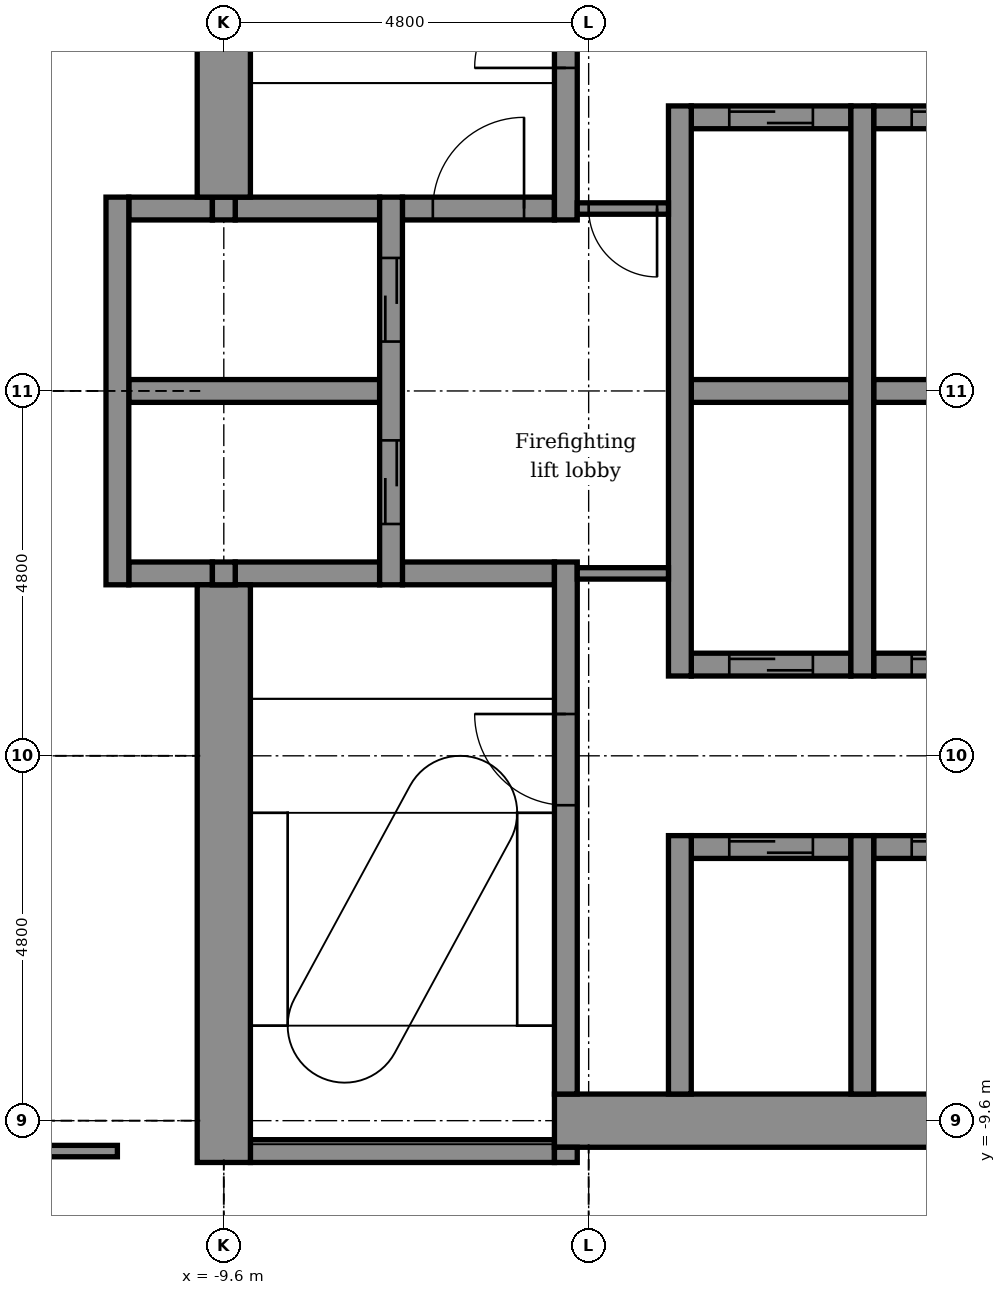
"""IFC4 building model, lengths in metres.
Left out: names, types, materials, properties, quantities, classifications, styles, units other than length and angle.
Written with IfcOpenShell. Run it as: python <this file> out.ifc"""

import sys

from ifc_helpers import new_model, si_unit, direction, frame, frame_2d, origin, place, context, subcontext, project, spatial, rectangle, extrude, element, fill, save


model = new_model("IFC4")
c1 = context("Model", 3, precision=1e-05, world=origin(), true_north=direction((0.0, 1.0)))
c2 = subcontext(c1, "Body", "Model", "MODEL_VIEW")
j1 = project(units=[si_unit("LENGTHUNIT", "METRE"), si_unit("PLANEANGLEUNIT", "RADIAN")], contexts=[c1])
p1 = place(None, origin())
s1 = spatial("IfcSite", under=j1, at=p1, CompositionType="ELEMENT")
p2 = place(p1, origin())
s2 = spatial("IfcBuilding", under=s1, at=p2, CompositionType="ELEMENT")
p3 = place(p2, frame((0.0, 0.0, 154.4)))
s3 = spatial("IfcBuildingStorey", under=s2, at=p3, CompositionType="ELEMENT", Elevation=154.4)
p4 = place(p3, frame((-9.25, -10.0, -0.15), z_axis=(0.0, 0.0, 1.0), x_axis=(1.0, 0.0, 0.0)))
e1 = element("IfcWall", 1, at=p4, inside=s3, PredefinedType="STANDARD", context=c2, shape_type="SweptSolid", body=[
    extrude(rectangle(XDim=4.0, YDim=0.3, at=frame_2d((2.0, 0.0))), origin(), (0.0, 0.0, 1.0), 3.9),
])
p5 = place(p3, frame((-5.25, -9.6, -0.15), z_axis=(0.0, 0.0, 1.0), x_axis=(1.0, 0.0, 0.0)))
e2 = element("IfcWall", 2, at=p5, inside=s3, PredefinedType="SHEAR", context=c2, shape_type="SweptSolid", body=[
    extrude(rectangle(XDim=10.2, YDim=0.7, at=frame_2d((5.1, 0.0))), origin(), (0.0, 0.0, 1.0), 3.9),
])
p6 = place(p5, frame((9.0, 0.0, 0.15)))
e3 = element("IfcOpeningElement", 3, at=p6, cuts=e2, PredefinedType="OPENING", context=c2, shape_type="SweptSolid", body=[
    extrude(rectangle(XDim=0.9, YDim=2.1, at=frame_2d((0.45, 1.05))), frame((0.0, 0.36, 0.0), z_axis=(0.0, -1.0, 0.0), x_axis=(1.0, 0.0, 0.0)), (0.0, 0.0, 1.0), 0.72),
])
p7 = place(p3, frame((-3.45, -6.0, -0.15), z_axis=(0.0, 0.0, 1.0), x_axis=(1.0, 0.0, 0.0)))
e4 = element("IfcWall", 4, at=p7, inside=s3, PredefinedType="STANDARD", context=c2, shape_type="SweptSolid", body=[
    extrude(rectangle(XDim=2.1, YDim=0.3, at=frame_2d((1.05, 0.0))), origin(), (0.0, 0.0, 1.0), 3.9),
])
p8 = place(p7, frame((0.5, 0.0, 0.15)))
e5 = element("IfcOpeningElement", 5, at=p8, cuts=e4, PredefinedType="OPENING", context=c2, shape_type="SweptSolid", body=[
    extrude(rectangle(XDim=1.1, YDim=2.1, at=frame_2d((0.55, 1.05))), frame((0.0, 0.16, 0.0), z_axis=(0.0, -1.0, 0.0), x_axis=(1.0, 0.0, 0.0)), (0.0, 0.0, 1.0), 0.32),
])
p9 = place(p3, frame((-1.05, -6.0, -0.15), z_axis=(0.0, 0.0, 1.0), x_axis=(1.0, 0.0, 0.0)))
e6 = element("IfcWall", 6, at=p9, inside=s3, PredefinedType="STANDARD", context=c2, shape_type="SweptSolid", body=[
    extrude(rectangle(XDim=2.1, YDim=0.3, at=frame_2d((1.05, 0.0))), origin(), (0.0, 0.0, 1.0), 3.9),
])
p10 = place(p9, frame((0.5, 0.0, 0.15)))
e7 = element("IfcOpeningElement", 7, at=p10, cuts=e6, PredefinedType="OPENING", context=c2, shape_type="SweptSolid", body=[
    extrude(rectangle(XDim=1.1, YDim=2.1, at=frame_2d((0.55, 1.05))), frame((0.0, 0.16, 0.0), z_axis=(0.0, -1.0, 0.0), x_axis=(1.0, 0.0, 0.0)), (0.0, 0.0, 1.0), 0.32),
])
p11 = place(p3, frame((-3.45, -3.6, -0.15), z_axis=(0.0, 0.0, 1.0), x_axis=(1.0, 0.0, 0.0)))
e8 = element("IfcWall", 8, at=p11, inside=s3, PredefinedType="STANDARD", context=c2, shape_type="SweptSolid", body=[
    extrude(rectangle(XDim=2.1, YDim=0.3, at=frame_2d((1.05, 0.0))), origin(), (0.0, 0.0, 1.0), 3.9),
])
p12 = place(p11, frame((0.5, 0.0, 0.15)))
e9 = element("IfcOpeningElement", 9, at=p12, cuts=e8, PredefinedType="OPENING", context=c2, shape_type="SweptSolid", body=[
    extrude(rectangle(XDim=1.1, YDim=2.1, at=frame_2d((0.55, 1.05))), frame((0.0, 0.16, 0.0), z_axis=(0.0, -1.0, 0.0), x_axis=(1.0, 0.0, 0.0)), (0.0, 0.0, 1.0), 0.32),
])
p13 = place(p3, frame((-1.05, -3.6, -0.15), z_axis=(0.0, 0.0, 1.0), x_axis=(1.0, 0.0, 0.0)))
e10 = element("IfcWall", 10, at=p13, inside=s3, PredefinedType="STANDARD", context=c2, shape_type="SweptSolid", body=[
    extrude(rectangle(XDim=2.1, YDim=0.3, at=frame_2d((1.05, 0.0))), origin(), (0.0, 0.0, 1.0), 3.9),
])
p14 = place(p13, frame((0.5, 0.0, 0.15)))
e11 = element("IfcOpeningElement", 11, at=p14, cuts=e10, PredefinedType="OPENING", context=c2, shape_type="SweptSolid", body=[
    extrude(rectangle(XDim=1.1, YDim=2.1, at=frame_2d((0.55, 1.05))), frame((0.0, 0.16, 0.0), z_axis=(0.0, -1.0, 0.0), x_axis=(1.0, 0.0, 0.0)), (0.0, 0.0, 1.0), 0.32),
])
p15 = place(p3, frame((-10.85, -2.4, -0.15), z_axis=(0.0, 0.0, 1.0), x_axis=(1.0, 0.0, 0.0)))
e12 = element("IfcWall", 12, at=p15, inside=s3, PredefinedType="STANDARD", context=c2, shape_type="SweptSolid", body=[
    extrude(rectangle(XDim=1.1, YDim=0.3, at=frame_2d((0.55, 0.0))), origin(), (0.0, 0.0, 1.0), 3.9),
])
p16 = place(p3, frame((-9.45, -2.4, -0.15), z_axis=(0.0, 0.0, 1.0), x_axis=(1.0, 0.0, 0.0)))
e13 = element("IfcWall", 13, at=p16, inside=s3, PredefinedType="STANDARD", context=c2, shape_type="SweptSolid", body=[
    extrude(rectangle(XDim=1.9, YDim=0.3, at=frame_2d((0.95, 0.0))), origin(), (0.0, 0.0, 1.0), 3.9),
])
p17 = place(p3, frame((-7.25, -2.4, -0.15), z_axis=(0.0, 0.0, 1.0), x_axis=(1.0, 0.0, 0.0)))
e14 = element("IfcWall", 14, at=p17, inside=s3, PredefinedType="STANDARD", context=c2, shape_type="SweptSolid", body=[
    extrude(rectangle(XDim=2.0, YDim=0.3, at=frame_2d((1.0, 0.0))), origin(), (0.0, 0.0, 1.0), 3.9),
])
p18 = place(p3, frame((-10.85, 0.0, -0.15), z_axis=(0.0, 0.0, 1.0), x_axis=(1.0, 0.0, 0.0)))
e15 = element("IfcWall", 15, at=p18, inside=s3, PredefinedType="STANDARD", context=c2, shape_type="SweptSolid", body=[
    extrude(rectangle(XDim=3.3, YDim=0.3, at=frame_2d((1.65, 0.0))), origin(), (0.0, 0.0, 1.0), 3.9),
])
p19 = place(p3, frame((-3.45, 0.0, -0.15), z_axis=(0.0, 0.0, 1.0), x_axis=(1.0, 0.0, 0.0)))
e16 = element("IfcWall", 16, at=p19, inside=s3, PredefinedType="STANDARD", context=c2, shape_type="SweptSolid", body=[
    extrude(rectangle(XDim=2.1, YDim=0.3, at=frame_2d((1.05, 0.0))), origin(), (0.0, 0.0, 1.0), 3.9),
])
p20 = place(p3, frame((-1.05, 0.0, -0.15), z_axis=(0.0, 0.0, 1.0), x_axis=(1.0, 0.0, 0.0)))
e17 = element("IfcWall", 17, at=p20, inside=s3, PredefinedType="STANDARD", context=c2, shape_type="SweptSolid", body=[
    extrude(rectangle(XDim=2.1, YDim=0.3, at=frame_2d((1.05, 0.0))), origin(), (0.0, 0.0, 1.0), 3.9),
])
p21 = place(p3, frame((-10.85, 2.4, -0.15), z_axis=(0.0, 0.0, 1.0), x_axis=(1.0, 0.0, 0.0)))
e18 = element("IfcWall", 18, at=p21, inside=s3, PredefinedType="STANDARD", context=c2, shape_type="SweptSolid", body=[
    extrude(rectangle(XDim=1.1, YDim=0.3, at=frame_2d((0.55, 0.0))), origin(), (0.0, 0.0, 1.0), 3.9),
])
p22 = place(p3, frame((-9.45, 2.4, -0.15), z_axis=(0.0, 0.0, 1.0), x_axis=(1.0, 0.0, 0.0)))
e19 = element("IfcWall", 19, at=p22, inside=s3, PredefinedType="STANDARD", context=c2, shape_type="SweptSolid", body=[
    extrude(rectangle(XDim=1.9, YDim=0.3, at=frame_2d((0.95, 0.0))), origin(), (0.0, 0.0, 1.0), 3.9),
])
p23 = place(p3, frame((-7.25, 2.4, -0.15), z_axis=(0.0, 0.0, 1.0), x_axis=(1.0, 0.0, 0.0)))
e20 = element("IfcWall", 20, at=p23, inside=s3, PredefinedType="STANDARD", context=c2, shape_type="SweptSolid", body=[
    extrude(rectangle(XDim=2.0, YDim=0.3, at=frame_2d((1.0, 0.0))), origin(), (0.0, 0.0, 1.0), 3.9),
])
p24 = place(p23, frame((0.4, 0.0, 0.15)))
e21 = element("IfcOpeningElement", 21, at=p24, cuts=e20, PredefinedType="OPENING", context=c2, shape_type="SweptSolid", body=[
    extrude(rectangle(XDim=1.2, YDim=2.1, at=frame_2d((0.6, 1.05))), frame((0.0, 0.16, 0.0), z_axis=(0.0, -1.0, 0.0), x_axis=(1.0, 0.0, 0.0)), (0.0, 0.0, 1.0), 0.32),
])
p25 = place(p3, frame((-3.45, 3.6, -0.15), z_axis=(0.0, 0.0, 1.0), x_axis=(1.0, 0.0, 0.0)))
e22 = element("IfcWall", 22, at=p25, inside=s3, PredefinedType="STANDARD", context=c2, shape_type="SweptSolid", body=[
    extrude(rectangle(XDim=2.1, YDim=0.3, at=frame_2d((1.05, 0.0))), origin(), (0.0, 0.0, 1.0), 3.9),
])
p26 = place(p25, frame((0.5, 0.0, 0.15)))
e23 = element("IfcOpeningElement", 23, at=p26, cuts=e22, PredefinedType="OPENING", context=c2, shape_type="SweptSolid", body=[
    extrude(rectangle(XDim=1.1, YDim=2.1, at=frame_2d((0.55, 1.05))), frame((0.0, 0.16, 0.0), z_axis=(0.0, -1.0, 0.0), x_axis=(1.0, 0.0, 0.0)), (0.0, 0.0, 1.0), 0.32),
])
p27 = place(p3, frame((-1.05, 3.6, -0.15), z_axis=(0.0, 0.0, 1.0), x_axis=(1.0, 0.0, 0.0)))
e24 = element("IfcWall", 24, at=p27, inside=s3, PredefinedType="STANDARD", context=c2, shape_type="SweptSolid", body=[
    extrude(rectangle(XDim=2.1, YDim=0.3, at=frame_2d((1.05, 0.0))), origin(), (0.0, 0.0, 1.0), 3.9),
])
p28 = place(p27, frame((0.5, 0.0, 0.15)))
e25 = element("IfcOpeningElement", 25, at=p28, cuts=e24, PredefinedType="OPENING", context=c2, shape_type="SweptSolid", body=[
    extrude(rectangle(XDim=1.1, YDim=2.1, at=frame_2d((0.55, 1.05))), frame((0.0, 0.16, 0.0), z_axis=(0.0, -1.0, 0.0), x_axis=(1.0, 0.0, 0.0)), (0.0, 0.0, 1.0), 0.32),
])
p29 = place(p3, frame((-11.0, -2.55, -0.15), z_axis=(0.0, 0.0, 1.0), x_axis=(0.0, 1.0, 0.0)))
e26 = element("IfcWall", 26, at=p29, inside=s3, PredefinedType="STANDARD", context=c2, shape_type="SweptSolid", body=[
    extrude(rectangle(XDim=5.1, YDim=0.3, at=frame_2d((2.55, 0.0))), origin(), (0.0, 0.0, 1.0), 3.9),
])
p30 = place(p3, frame((-9.6, -10.15, -0.15), z_axis=(0.0, 0.0, 1.0), x_axis=(0.0, 1.0, 0.0)))
e27 = element("IfcWall", 27, at=p30, inside=s3, PredefinedType="SHEAR", context=c2, shape_type="SweptSolid", body=[
    extrude(rectangle(XDim=7.6, YDim=0.7, at=frame_2d((3.8, 0.0))), origin(), (0.0, 0.0, 1.0), 3.9),
])
for number, where, z_axis, x_axis in (
    (28, (-9.6, -2.55, -0.15), (0.0, 0.0, 1.0), (0.0, 1.0, 0.0)),
    (29, (-9.6, 2.25, -0.15), (0.0, 0.0, 1.0), (0.0, 1.0, 0.0)),
):
    element("IfcWall", number, at=place(p3, frame(where, z_axis=z_axis, x_axis=x_axis)), inside=s3, PredefinedType="STANDARD", context=c2, shape_type="SweptSolid", body=[
        extrude(rectangle(XDim=0.3, YDim=0.3, at=frame_2d((0.15, 0.0))), origin(), (0.0, 0.0, 1.0), 3.9),
    ])
p31 = place(p3, frame((-9.6, 2.55, -0.15), z_axis=(0.0, 0.0, 1.0), x_axis=(0.0, 1.0, 0.0)))
e30 = element("IfcWall", 30, at=p31, inside=s3, PredefinedType="SHEAR", context=c2, shape_type="SweptSolid", body=[
    extrude(rectangle(XDim=7.6, YDim=0.7, at=frame_2d((3.8, 0.0))), origin(), (0.0, 0.0, 1.0), 3.9),
])
p32 = place(p3, frame((-7.4, -2.55, -0.15), z_axis=(0.0, 0.0, 1.0), x_axis=(0.0, 1.0, 0.0)))
e31 = element("IfcWall", 31, at=p32, inside=s3, PredefinedType="STANDARD", context=c2, shape_type="SweptSolid", body=[
    extrude(rectangle(XDim=5.1, YDim=0.3, at=frame_2d((2.55, 0.0))), origin(), (0.0, 0.0, 1.0), 3.9),
])
p33 = place(p32, frame((0.8, 0.0, 0.15)))
e32 = element("IfcOpeningElement", 32, at=p33, cuts=e31, PredefinedType="OPENING", context=c2, shape_type="SweptSolid", body=[
    extrude(rectangle(XDim=1.1, YDim=2.1, at=frame_2d((0.55, 1.05))), frame((0.0, 0.16, 0.0), z_axis=(0.0, -1.0, 0.0), x_axis=(1.0, 0.0, 0.0)), (0.0, 0.0, 1.0), 0.32),
])
p34 = place(p32, frame((3.2, 0.0, 0.15)))
e33 = element("IfcOpeningElement", 33, at=p34, cuts=e31, PredefinedType="OPENING", context=c2, shape_type="SweptSolid", body=[
    extrude(rectangle(XDim=1.1, YDim=2.1, at=frame_2d((0.55, 1.05))), frame((0.0, 0.16, 0.0), z_axis=(0.0, -1.0, 0.0), x_axis=(1.0, 0.0, 0.0)), (0.0, 0.0, 1.0), 0.32),
])
p35 = place(p3, frame((-5.1, -10.15, -0.15), z_axis=(0.0, 0.0, 1.0), x_axis=(0.0, 1.0, 0.0)))
e34 = element("IfcWall", 34, at=p35, inside=s3, PredefinedType="STANDARD", context=c2, shape_type="SweptSolid", body=[
    extrude(rectangle(XDim=0.2, YDim=0.3, at=frame_2d((0.1, 0.0))), origin(), (0.0, 0.0, 1.0), 3.9),
])
p36 = place(p3, frame((-5.1, -9.25, -0.15), z_axis=(0.0, 0.0, 1.0), x_axis=(0.0, 1.0, 0.0)))
e35 = element("IfcWall", 35, at=p36, inside=s3, PredefinedType="STANDARD", context=c2, shape_type="SweptSolid", body=[
    extrude(rectangle(XDim=7.0, YDim=0.3, at=frame_2d((3.5, 0.0))), origin(), (0.0, 0.0, 1.0), 3.9),
])
p37 = place(p36, frame((3.8, 0.0, 0.15)))
e36 = element("IfcOpeningElement", 36, at=p37, cuts=e35, PredefinedType="OPENING", context=c2, shape_type="SweptSolid", body=[
    extrude(rectangle(XDim=1.2, YDim=2.1, at=frame_2d((0.6, 1.05))), frame((0.0, 0.16, 0.0), z_axis=(0.0, -1.0, 0.0), x_axis=(1.0, 0.0, 0.0)), (0.0, 0.0, 1.0), 0.32),
])
p38 = place(p3, frame((-5.1, 2.25, -0.15), z_axis=(0.0, 0.0, 1.0), x_axis=(0.0, 1.0, 0.0)))
e37 = element("IfcWall", 37, at=p38, inside=s3, PredefinedType="STANDARD", context=c2, shape_type="SweptSolid", body=[
    extrude(rectangle(XDim=7.0, YDim=0.3, at=frame_2d((3.5, 0.0))), origin(), (0.0, 0.0, 1.0), 3.9),
])
p39 = place(p38, frame((2.0, 0.0, 0.15)))
e38 = element("IfcOpeningElement", 38, at=p39, cuts=e37, PredefinedType="OPENING", context=c2, shape_type="SweptSolid", body=[
    extrude(rectangle(XDim=1.2, YDim=2.1, at=frame_2d((0.6, 1.05))), frame((0.0, 0.16, 0.0), z_axis=(0.0, -1.0, 0.0), x_axis=(1.0, 0.0, 0.0)), (0.0, 0.0, 1.0), 0.32),
])
p40 = place(p3, frame((-3.6, -9.25, -0.15), z_axis=(0.0, 0.0, 1.0), x_axis=(0.0, 1.0, 0.0)))
e39 = element("IfcWall", 39, at=p40, inside=s3, PredefinedType="STANDARD", context=c2, shape_type="SweptSolid", body=[
    extrude(rectangle(XDim=3.4, YDim=0.3, at=frame_2d((1.7, 0.0))), origin(), (0.0, 0.0, 1.0), 3.9),
])
p41 = place(p3, frame((-3.6, -3.75, -0.15), z_axis=(0.0, 0.0, 1.0), x_axis=(0.0, 1.0, 0.0)))
e40 = element("IfcWall", 40, at=p41, inside=s3, PredefinedType="STANDARD", context=c2, shape_type="SweptSolid", body=[
    extrude(rectangle(XDim=7.5, YDim=0.3, at=frame_2d((3.75, 0.0))), origin(), (0.0, 0.0, 1.0), 3.9),
])
p42 = place(p3, frame((-1.2, -9.25, -0.15), z_axis=(0.0, 0.0, 1.0), x_axis=(0.0, 1.0, 0.0)))
e41 = element("IfcWall", 41, at=p42, inside=s3, PredefinedType="STANDARD", context=c2, shape_type="SweptSolid", body=[
    extrude(rectangle(XDim=3.4, YDim=0.3, at=frame_2d((1.7, 0.0))), origin(), (0.0, 0.0, 1.0), 3.9),
])
p43 = place(p3, frame((-1.2, -3.75, -0.15), z_axis=(0.0, 0.0, 1.0), x_axis=(0.0, 1.0, 0.0)))
e42 = element("IfcWall", 42, at=p43, inside=s3, PredefinedType="STANDARD", context=c2, shape_type="SweptSolid", body=[
    extrude(rectangle(XDim=7.5, YDim=0.3, at=frame_2d((3.75, 0.0))), origin(), (0.0, 0.0, 1.0), 3.9),
])
p44 = place(p3, frame((-21.156, -10.0, 0.0), z_axis=(0.0, 0.0, 1.0), x_axis=(1.0, 0.0, 0.0)))
e43 = element("IfcWall", 43, at=p44, inside=s3, PredefinedType="PARTITIONING", context=c2, shape_type="SweptSolid", body=[
    extrude(rectangle(XDim=10.156, YDim=0.15, at=frame_2d((5.078, 0.0))), origin(), (0.0, 0.0, 1.0), 3.75),
])
p45 = place(p44, frame((3.083, 0.0, 0.0)))
e44 = element("IfcOpeningElement", 44, at=p45, cuts=e43, PredefinedType="OPENING", context=c2, shape_type="SweptSolid", body=[
    extrude(rectangle(XDim=1.8, YDim=2.1, at=frame_2d((0.9, 1.05))), frame((0.0, 0.085, 0.0), z_axis=(0.0, -1.0, 0.0), x_axis=(1.0, 0.0, 0.0)), (0.0, 0.0, 1.0), 0.17),
])
p46 = place(p3, frame((-4.95, 2.4, 0.0), z_axis=(0.0, 0.0, 1.0), x_axis=(1.0, 0.0, 0.0)))
e45 = element("IfcWall", 45, at=p46, inside=s3, PredefinedType="PARTITIONING", context=c2, shape_type="SweptSolid", body=[
    extrude(rectangle(XDim=1.2, YDim=0.15, at=frame_2d((0.6, 0.0))), origin(), (0.0, 0.0, 1.0), 3.75),
])
p47 = place(p46, frame((0.15, 0.0, 0.0)))
e46 = element("IfcOpeningElement", 46, at=p47, cuts=e45, PredefinedType="OPENING", context=c2, shape_type="SweptSolid", body=[
    extrude(rectangle(XDim=0.9, YDim=2.1, at=frame_2d((0.45, 1.05))), frame((0.0, 0.085, 0.0), z_axis=(0.0, -1.0, 0.0), x_axis=(1.0, 0.0, 0.0)), (0.0, 0.0, 1.0), 0.17),
])
p48 = place(p3, frame((-4.95, -2.4, 0.0), z_axis=(0.0, 0.0, 1.0), x_axis=(1.0, 0.0, 0.0)))
e47 = element("IfcWall", 47, at=p48, inside=s3, PredefinedType="PARTITIONING", context=c2, shape_type="SweptSolid", body=[
    extrude(rectangle(XDim=1.2, YDim=0.15, at=frame_2d((0.6, 0.0))), origin(), (0.0, 0.0, 1.0), 3.75),
])
p49 = place(p33, origin())
e48 = element("IfcDoor", 48, at=p49, inside=s3, OperationType="DOUBLE_DOOR_SLIDING", PredefinedType="DOOR", context=c2, shape_type="SweptSolid", body=[
    extrude(rectangle(XDim=1.1, YDim=2.1, at=frame_2d((0.55, 1.05))), frame((0.0, 0.025, 0.0), z_axis=(0.0, -1.0, 0.0), x_axis=(1.0, 0.0, 0.0)), (0.0, 0.0, 1.0), 0.05),
])
fill(e32, e48)
p50 = place(p34, origin())
e49 = element("IfcDoor", 49, at=p50, inside=s3, OperationType="DOUBLE_DOOR_SLIDING", PredefinedType="DOOR", context=c2, shape_type="SweptSolid", body=[
    extrude(rectangle(XDim=1.1, YDim=2.1, at=frame_2d((0.55, 1.05))), frame((0.0, 0.025, 0.0), z_axis=(0.0, -1.0, 0.0), x_axis=(1.0, 0.0, 0.0)), (0.0, 0.0, 1.0), 0.05),
])
fill(e33, e49)
p51 = place(p26, origin())
e50 = element("IfcDoor", 50, at=p51, inside=s3, OperationType="DOUBLE_DOOR_SLIDING", PredefinedType="DOOR", context=c2, shape_type="SweptSolid", body=[
    extrude(rectangle(XDim=1.1, YDim=2.1, at=frame_2d((0.55, 1.05))), frame((0.0, 0.025, 0.0), z_axis=(0.0, -1.0, 0.0), x_axis=(1.0, 0.0, 0.0)), (0.0, 0.0, 1.0), 0.05),
])
fill(e23, e50)
p52 = place(p28, origin())
e51 = element("IfcDoor", 51, at=p52, inside=s3, OperationType="DOUBLE_DOOR_SLIDING", PredefinedType="DOOR", context=c2, shape_type="SweptSolid", body=[
    extrude(rectangle(XDim=1.1, YDim=2.1, at=frame_2d((0.55, 1.05))), frame((0.0, 0.025, 0.0), z_axis=(0.0, -1.0, 0.0), x_axis=(1.0, 0.0, 0.0)), (0.0, 0.0, 1.0), 0.05),
])
fill(e25, e51)
p53 = place(p12, origin())
e52 = element("IfcDoor", 52, at=p53, inside=s3, OperationType="DOUBLE_DOOR_SLIDING", PredefinedType="DOOR", context=c2, shape_type="SweptSolid", body=[
    extrude(rectangle(XDim=1.1, YDim=2.1, at=frame_2d((0.55, 1.05))), frame((0.0, 0.025, 0.0), z_axis=(0.0, -1.0, 0.0), x_axis=(1.0, 0.0, 0.0)), (0.0, 0.0, 1.0), 0.05),
])
fill(e9, e52)
p54 = place(p14, origin())
e53 = element("IfcDoor", 53, at=p54, inside=s3, OperationType="DOUBLE_DOOR_SLIDING", PredefinedType="DOOR", context=c2, shape_type="SweptSolid", body=[
    extrude(rectangle(XDim=1.1, YDim=2.1, at=frame_2d((0.55, 1.05))), frame((0.0, 0.025, 0.0), z_axis=(0.0, -1.0, 0.0), x_axis=(1.0, 0.0, 0.0)), (0.0, 0.0, 1.0), 0.05),
])
fill(e11, e53)
p55 = place(p8, origin())
e54 = element("IfcDoor", 54, at=p55, inside=s3, OperationType="DOUBLE_DOOR_SLIDING", PredefinedType="DOOR", context=c2, shape_type="SweptSolid", body=[
    extrude(rectangle(XDim=1.1, YDim=2.1, at=frame_2d((0.55, 1.05))), frame((0.0, 0.025, 0.0), z_axis=(0.0, -1.0, 0.0), x_axis=(1.0, 0.0, 0.0)), (0.0, 0.0, 1.0), 0.05),
])
fill(e5, e54)
p56 = place(p10, origin())
e55 = element("IfcDoor", 55, at=p56, inside=s3, OperationType="DOUBLE_DOOR_SLIDING", PredefinedType="DOOR", context=c2, shape_type="SweptSolid", body=[
    extrude(rectangle(XDim=1.1, YDim=2.1, at=frame_2d((0.55, 1.05))), frame((0.0, 0.025, 0.0), z_axis=(0.0, -1.0, 0.0), x_axis=(1.0, 0.0, 0.0)), (0.0, 0.0, 1.0), 0.05),
])
fill(e7, e55)
p57 = place(p39, origin())
e56 = element("IfcDoor", 56, at=p57, inside=s3, OperationType="SINGLE_SWING_LEFT", PredefinedType="DOOR", context=c2, shape_type="SweptSolid", body=[
    extrude(rectangle(XDim=1.2, YDim=2.1, at=frame_2d((0.6, 1.05))), frame((0.0, 0.025, 0.0), z_axis=(0.0, -1.0, 0.0), x_axis=(1.0, 0.0, 0.0)), (0.0, 0.0, 1.0), 0.05),
])
fill(e38, e56)
p58 = place(p37, origin())
e57 = element("IfcDoor", 57, at=p58, inside=s3, OperationType="SINGLE_SWING_RIGHT", PredefinedType="DOOR", context=c2, shape_type="SweptSolid", body=[
    extrude(rectangle(XDim=1.2, YDim=2.1, at=frame_2d((0.6, 1.05))), frame((0.0, 0.025, 0.0), z_axis=(0.0, -1.0, 0.0), x_axis=(1.0, 0.0, 0.0)), (0.0, 0.0, 1.0), 0.05),
])
fill(e36, e57)
p59 = place(p47, frame((0.9, 0.0, 0.0), z_axis=(0.0, 0.0, 1.0), x_axis=(-1.0, 0.0, 0.0)))
e58 = element("IfcDoor", 58, at=p59, inside=s3, OperationType="SINGLE_SWING_RIGHT", PredefinedType="DOOR", context=c2, shape_type="SweptSolid", body=[
    extrude(rectangle(XDim=0.9, YDim=2.1, at=frame_2d((0.45, 1.05))), frame((0.0, 0.025, 0.0), z_axis=(0.0, -1.0, 0.0), x_axis=(1.0, 0.0, 0.0)), (0.0, 0.0, 1.0), 0.05),
])
fill(e46, e58)
p60 = place(p24, origin())
e59 = element("IfcDoor", 59, at=p60, inside=s3, OperationType="SINGLE_SWING_RIGHT", PredefinedType="DOOR", context=c2, shape_type="SweptSolid", body=[
    extrude(rectangle(XDim=1.2, YDim=2.1, at=frame_2d((0.6, 1.05))), frame((0.0, 0.025, 0.0), z_axis=(0.0, -1.0, 0.0), x_axis=(1.0, 0.0, 0.0)), (0.0, 0.0, 1.0), 0.05),
])
fill(e21, e59)
save(model, sys.argv[1])
